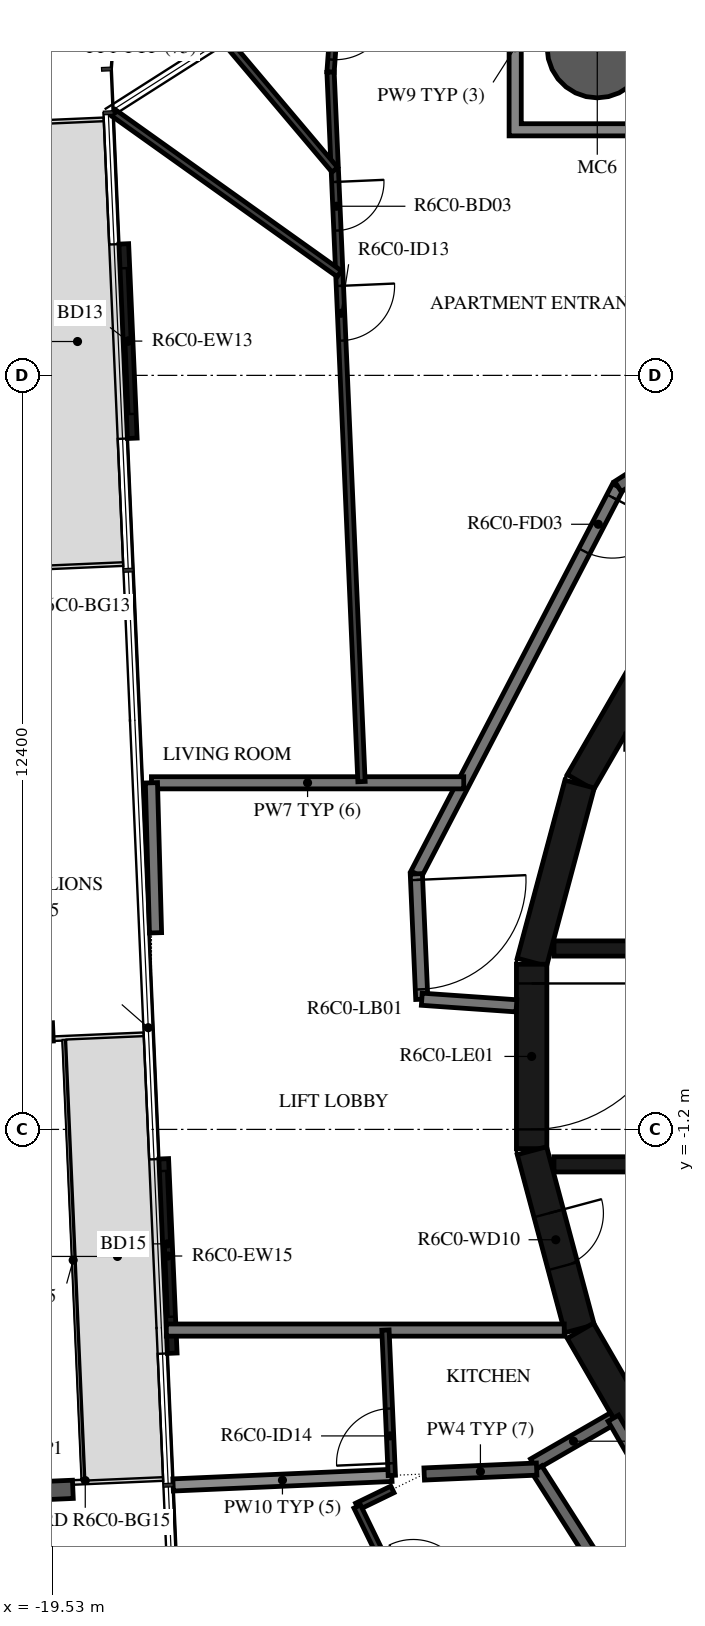
"""IFC4 building model, lengths in metres.
Left out: names, types, materials, properties, quantities, classifications, styles, units other than length and angle.
Written with IfcOpenShell. Run it as: python <this file> out.ifc"""

import sys

from ifc_helpers import new_model, si_unit, direction, frame, frame_2d, origin, origin_2d, place, context, subcontext, project, spatial, polyline, rectangle, hollow_circle, i_section, outline, extrude, element, fill, save


model = new_model("IFC4")
c1 = context("Model", 3, precision=1e-05, world=origin(), true_north=direction((0.0, 1.0)))
c2 = subcontext(c1, "Body", "Model", "MODEL_VIEW")
j1 = project(units=[si_unit("LENGTHUNIT", "METRE"), si_unit("PLANEANGLEUNIT", "RADIAN")], contexts=[c1])
p1 = place(None, origin())
s1 = spatial("IfcSite", under=j1, at=p1, CompositionType="ELEMENT")
p2 = place(p1, origin())
s2 = spatial("IfcBuilding", under=s1, at=p2, CompositionType="ELEMENT")
p3 = place(p2, frame((0.0, 0.0, 247.7)))
s3 = spatial("IfcBuildingStorey", under=s2, at=p3, CompositionType="ELEMENT", Elevation=247.7)
p4 = place(p3, frame((-10.568, 16.588, -0.38), z_axis=(0.0, 0.0, 1.0), x_axis=(1.0, 0.0, 0.0)))
e1 = element("IfcColumn", 1, at=p4, inside=s3, PredefinedType="COLUMN", context=c2, shape_type="SweptSolid", body=[
    extrude(hollow_circle(Radius=0.825, WallThickness=0.04, at=origin_2d()), origin(), (0.0, 0.0, 1.0), 3.5),
])
for number, where, z_axis, x_axis in (
    (2, (-19.97, 0.384, -0.38), (0.0, 0.0, 1.0), (-0.044, 0.999, 0.0)),
    (3, (-19.642, -7.139, -0.38), (0.0, 0.0, 1.0), (-0.044, 0.999, 0.0)),
):
    element("IfcColumn", number, at=place(p3, frame(where, z_axis=z_axis, x_axis=x_axis)), inside=s3, PredefinedType="COLUMN", context=c2, shape_type="SweptSolid", body=[
        extrude(i_section(OverallWidth=0.3, OverallDepth=0.9, WebThickness=0.019, FlangeThickness=0.035, FilletRadius=0.03, at=origin_2d()), origin(), (0.0, 0.0, 1.0), 3.5),
    ])
p5 = place(p3, frame((-18.355, 13.362, 0.0), z_axis=(0.0, 0.0, 1.0), x_axis=(0.043639181999, -0.999047357133, 0.0)))
e4 = element("IfcWall", 4, at=p5, inside=s3, PredefinedType="STANDARD", context=c2, shape_type="SweptSolid", body=[
    extrude(rectangle(XDim=3.2, YDim=0.16, at=frame_2d((1.6, 0.0))), origin(), (0.0, 0.0, 1.0), 3.12),
])
p6 = place(p5, frame((0.4, 0.0, 0.0)))
e5 = element("IfcOpeningElement", 5, at=p6, cuts=e4, PredefinedType="OPENING", context=c2, shape_type="SweptSolid", body=[
    extrude(rectangle(XDim=2.4, YDim=2.4, at=frame_2d((1.2, 1.2))), frame((0.0, 0.09, 0.0), z_axis=(0.0, -1.0, 0.0), x_axis=(1.0, 0.0, 0.0)), (0.0, 0.0, 1.0), 0.18),
])
p7 = place(p3, frame((-17.698, -1.684, 0.0), z_axis=(0.0, 0.0, 1.0), x_axis=(0.043639181999, -0.999047357133, 0.0)))
e6 = element("IfcWall", 6, at=p7, inside=s3, PredefinedType="STANDARD", context=c2, shape_type="SweptSolid", body=[
    extrude(rectangle(XDim=3.2, YDim=0.16, at=frame_2d((1.6, 0.0))), origin(), (0.0, 0.0, 1.0), 3.12),
])
p8 = place(p7, frame((0.2, 0.0, 0.0)))
e7 = element("IfcOpeningElement", 7, at=p8, cuts=e6, PredefinedType="OPENING", context=c2, shape_type="SweptSolid", body=[
    extrude(rectangle(XDim=2.4, YDim=2.4, at=frame_2d((1.2, 1.2))), frame((0.0, 0.09, 0.0), z_axis=(0.0, -1.0, 0.0), x_axis=(1.0, 0.0, 0.0)), (0.0, 0.0, 1.0), 0.18),
])
for number, where, z_axis, x_axis in (
    (8, (-9.329, 7.137, 0.0), (0.0, 0.0, 1.0), (-0.5, -0.866, 0.0)),
    (9, (-10.858, 4.479, 0.0), (0.0, 0.0, 1.0), (-0.259, -0.966, 0.0)),
):
    element("IfcWall", number, at=place(p3, frame(where, z_axis=z_axis, x_axis=x_axis)), inside=s3, PredefinedType="SHEAR", context=c2, shape_type="SweptSolid", body=[
        extrude(rectangle(XDim=3.033, YDim=0.5, at=frame_2d((1.516, 0.0))), origin(), (0.0, 0.0, 1.0), 3.12),
    ])
p9 = place(p3, frame((-11.647, 1.516, 0.0), z_axis=(0.0, 0.0, 1.0), x_axis=(0.0, -1.0, 0.0)))
e10 = element("IfcWall", 10, at=p9, inside=s3, PredefinedType="SHEAR", context=c2, shape_type="SweptSolid", body=[
    extrude(rectangle(XDim=3.033, YDim=0.5, at=frame_2d((1.516, 0.0))), origin(), (0.0, 0.0, 1.0), 3.12),
])
p10 = place(p9, frame((0.316, 0.0, 0.0)))
e11 = element("IfcOpeningElement", 11, at=p10, cuts=e10, PredefinedType="OPENING", context=c2, shape_type="SweptSolid", body=[
    extrude(rectangle(XDim=2.4, YDim=2.1, at=frame_2d((1.2, 1.05))), frame((0.0, 0.26, 0.0), z_axis=(0.0, -1.0, 0.0), x_axis=(1.0, 0.0, 0.0)), (0.0, 0.0, 1.0), 0.52),
])
p11 = place(p3, frame((-11.643, -1.55, 0.0), z_axis=(0.0, 0.0, 1.0), x_axis=(0.258734743916, -0.965948410781, 0.0)))
e12 = element("IfcWall", 12, at=p11, inside=s3, PredefinedType="SHEAR", context=c2, shape_type="SweptSolid", body=[
    extrude(rectangle(XDim=3.033, YDim=0.5, at=frame_2d((1.516, 0.0))), origin(), (0.0, 0.0, 1.0), 3.12),
])
p12 = place(p11, frame((1.066, 0.0, 0.0)))
e13 = element("IfcOpeningElement", 13, at=p12, cuts=e12, PredefinedType="OPENING", context=c2, shape_type="SweptSolid", body=[
    extrude(rectangle(XDim=0.9, YDim=2.1, at=frame_2d((0.45, 1.05))), frame((0.0, 0.26, 0.0), z_axis=(0.0, -1.0, 0.0), x_axis=(1.0, 0.0, 0.0)), (0.0, 0.0, 1.0), 0.52),
])
p13 = place(p3, frame((-10.845, -4.51, 0.0), z_axis=(0.0, 0.0, 1.0), x_axis=(0.500087131594, -0.865975092491, 0.0)))
e14 = element("IfcWall", 14, at=p13, inside=s3, PredefinedType="SHEAR", context=c2, shape_type="SweptSolid", body=[
    extrude(rectangle(XDim=3.033, YDim=0.5, at=frame_2d((1.516, 0.0))), origin(), (0.0, 0.0, 1.0), 3.12),
])
p14 = place(p3, frame((-11.28, 1.775, 0.0), z_axis=(0.0, 0.0, 1.0), x_axis=(1.0, 0.0, 0.0)))
e15 = element("IfcWall", 15, at=p14, inside=s3, PredefinedType="SHEAR", context=c2, shape_type="SweptSolid", body=[
    extrude(rectangle(XDim=14.38, YDim=0.25, at=frame_2d((7.19, 0.0))), origin(), (0.0, 0.0, 1.0), 3.12),
])
p15 = place(p14, frame((10.73, 0.0, 0.0)))
e16 = element("IfcOpeningElement", 16, at=p15, cuts=e15, PredefinedType="OPENING", context=c2, shape_type="SweptSolid", body=[
    extrude(rectangle(XDim=1.1, YDim=2.1, at=frame_2d((0.55, 1.05))), frame((0.0, 0.135, 0.0), z_axis=(0.0, -1.0, 0.0), x_axis=(1.0, 0.0, 0.0)), (0.0, 0.0, 1.0), 0.27),
])
p16 = place(p14, frame((12.88, 0.0, 0.0)))
e17 = element("IfcOpeningElement", 17, at=p16, cuts=e15, PredefinedType="OPENING", context=c2, shape_type="SweptSolid", body=[
    extrude(rectangle(XDim=1.1, YDim=2.1, at=frame_2d((0.55, 1.05))), frame((0.0, 0.135, 0.0), z_axis=(0.0, -1.0, 0.0), x_axis=(1.0, 0.0, 0.0)), (0.0, 0.0, 1.0), 0.27),
])
p17 = place(p14, frame((5.455, 0.0, 0.0)))
e18 = element("IfcOpeningElement", 18, at=p17, cuts=e15, PredefinedType="OPENING", context=c2, shape_type="SweptSolid", body=[
    extrude(rectangle(XDim=0.9, YDim=2.1, at=frame_2d((0.45, 1.05))), frame((0.0, 0.135, 0.0), z_axis=(0.0, -1.0, 0.0), x_axis=(1.0, 0.0, 0.0)), (0.0, 0.0, 1.0), 0.27),
])
p18 = place(p3, frame((-11.28, -1.775, 0.0), z_axis=(0.0, 0.0, 1.0), x_axis=(1.0, 0.0, 0.0)))
e19 = element("IfcWall", 19, at=p18, inside=s3, PredefinedType="SHEAR", context=c2, shape_type="SweptSolid", body=[
    extrude(rectangle(XDim=14.38, YDim=0.25, at=frame_2d((7.19, 0.0))), origin(), (0.0, 0.0, 1.0), 3.12),
])
p19 = place(p18, frame((12.88, 0.0, 0.0)))
e20 = element("IfcOpeningElement", 20, at=p19, cuts=e19, PredefinedType="OPENING", context=c2, shape_type="SweptSolid", body=[
    extrude(rectangle(XDim=1.1, YDim=2.1, at=frame_2d((0.55, 1.05))), frame((0.0, 0.135, 0.0), z_axis=(0.0, -1.0, 0.0), x_axis=(1.0, 0.0, 0.0)), (0.0, 0.0, 1.0), 0.27),
])
p20 = place(p18, frame((6.53, 0.0, 0.0)))
e21 = element("IfcOpeningElement", 21, at=p20, cuts=e19, PredefinedType="OPENING", context=c2, shape_type="SweptSolid", body=[
    extrude(rectangle(XDim=0.9, YDim=2.1, at=frame_2d((0.45, 1.05))), frame((0.0, 0.135, 0.0), z_axis=(0.0, -1.0, 0.0), x_axis=(1.0, 0.0, 0.0)), (0.0, 0.0, 1.0), 0.27),
])
p21 = place(p18, frame((8.68, 0.0, 0.0)))
e22 = element("IfcOpeningElement", 22, at=p21, cuts=e19, PredefinedType="OPENING", context=c2, shape_type="SweptSolid", body=[
    extrude(rectangle(XDim=0.9, YDim=2.1, at=frame_2d((0.45, 1.05))), frame((0.0, 0.135, 0.0), z_axis=(0.0, -1.0, 0.0), x_axis=(1.0, 0.0, 0.0)), (0.0, 0.0, 1.0), 0.27),
])
p22 = place(p18, frame((10.83, 0.0, 0.0)))
e23 = element("IfcOpeningElement", 23, at=p22, cuts=e19, PredefinedType="OPENING", context=c2, shape_type="SweptSolid", body=[
    extrude(rectangle(XDim=0.9, YDim=2.1, at=frame_2d((0.45, 1.05))), frame((0.0, 0.135, 0.0), z_axis=(0.0, -1.0, 0.0), x_axis=(1.0, 0.0, 0.0)), (0.0, 0.0, 1.0), 0.27),
])
p23 = place(p3, frame((-10.228, 9.372, 0.0), z_axis=(0.0, 0.0, 1.0), x_axis=(-0.461759464021, -0.887005184532, 0.0)))
e24 = element("IfcWall", 24, at=p23, inside=s3, PredefinedType="STANDARD", context=c2, shape_type="SweptSolid", body=[
    extrude(rectangle(XDim=7.181, YDim=0.2, at=frame_2d((3.591, 0.0))), origin(), (0.0, 0.0, 1.0), 3.12),
])
p24 = place(p23, frame((0.2, 0.0, 0.0)))
e25 = element("IfcOpeningElement", 25, at=p24, cuts=e24, PredefinedType="OPENING", context=c2, shape_type="SweptSolid", body=[
    extrude(rectangle(XDim=1.0, YDim=2.1, at=frame_2d((0.5, 1.05))), frame((0.0, 0.11, 0.0), z_axis=(0.0, -1.0, 0.0), x_axis=(1.0, 0.0, 0.0)), (0.0, 0.0, 1.0), 0.22),
])
p25 = place(p3, frame((-13.544, 3.003, 0.0), z_axis=(0.0, 0.0, 1.0), x_axis=(0.043652842459, -0.99904676034, 0.0)))
e26 = element("IfcWall", 26, at=p25, inside=s3, PredefinedType="STANDARD", context=c2, shape_type="SweptSolid", body=[
    extrude(rectangle(XDim=2.064, YDim=0.2, at=frame_2d((1.032, 0.0))), origin(), (0.0, 0.0, 1.0), 3.12),
])
p26 = place(p25, frame((0.1, 0.0, 0.0)))
e27 = element("IfcOpeningElement", 27, at=p26, cuts=e26, PredefinedType="OPENING", context=c2, shape_type="SweptSolid", body=[
    extrude(rectangle(XDim=1.8, YDim=2.1, at=frame_2d((0.9, 1.05))), frame((0.0, 0.11, 0.0), z_axis=(0.0, -1.0, 0.0), x_axis=(1.0, 0.0, 0.0)), (0.0, 0.0, 1.0), 0.22),
])
p27 = place(p3, frame((-13.454, 0.941, 0.0), z_axis=(0.0, 0.0, 1.0), x_axis=(0.99755155062, -0.069934997354, 0.0)))
e28 = element("IfcWall", 28, at=p27, inside=s3, PredefinedType="STANDARD", context=c2, shape_type="SweptSolid", body=[
    extrude(rectangle(XDim=1.561, YDim=0.2, at=frame_2d((0.78, 0.0))), origin(), (0.0, 0.0, 1.0), 3.12),
])
p28 = place(p3, frame((-4.172, 13.231, 0.0), z_axis=(0.0, 0.0, 1.0), x_axis=(-0.843388394728, -0.537304397561, 0.0)))
e29 = element("IfcWall", 29, at=p28, inside=s3, PredefinedType="STANDARD", context=c2, shape_type="SweptSolid", body=[
    extrude(rectangle(XDim=7.181, YDim=0.2, at=frame_2d((3.59, 0.0))), origin(), (0.0, 0.0, 1.0), 3.12),
])
p29 = place(p3, frame((-10.303, -5.949, 0.0), z_axis=(0.0, 0.0, 1.0), x_axis=(-0.866043382451, -0.499968858743, 0.0)))
e30 = element("IfcWall", 30, at=p29, inside=s3, PredefinedType="STANDARD", context=c2, shape_type="SweptSolid", body=[
    extrude(rectangle(XDim=1.515, YDim=0.2, at=frame_2d((0.758, 0.0))), origin(), (0.0, 0.0, 1.0), 3.12),
])
p30 = place(p3, frame((-9.52, -7.305, 0.0), z_axis=(0.0, 0.0, 1.0), x_axis=(-0.500028278809, 0.866009076391, 0.0)))
e31 = element("IfcWall", 31, at=p30, inside=s3, PredefinedType="STANDARD", context=c2, shape_type="SweptSolid", body=[
    extrude(rectangle(XDim=1.566, YDim=0.2, at=frame_2d((0.783, 0.0))), origin(), (0.0, 0.0, 1.0), 3.12),
])
p31 = place(p3, frame((-11.565, -6.786, 0.0), z_axis=(0.0, 0.0, 1.0), x_axis=(0.537297327359, -0.843392898958, 0.0)))
e32 = element("IfcWall", 32, at=p31, inside=s3, PredefinedType="STANDARD", context=c2, shape_type="SweptSolid", body=[
    extrude(rectangle(XDim=4.081, YDim=0.2, at=frame_2d((2.041, 0.0))), origin(), (0.0, 0.0, 1.0), 3.12),
])
p32 = place(p3, frame((-12.764, 4.5, 0.0), z_axis=(0.0, 0.0, 1.0), x_axis=(-1.0, 0.0, 0.0)))
e33 = element("IfcWall", 33, at=p32, inside=s3, PredefinedType="STANDARD", context=c2, shape_type="SweptSolid", body=[
    extrude(rectangle(XDim=5.135, YDim=0.2, at=frame_2d((2.568, 0.0))), origin(), (0.0, 0.0, 1.0), 3.12),
])
p33 = place(p3, frame((-17.9, 4.5, 0.0), z_axis=(0.0, 0.0, 1.0), x_axis=(0.027204178319, -0.999629897853, 0.0)))
e34 = element("IfcWall", 34, at=p33, inside=s3, PredefinedType="STANDARD", context=c2, shape_type="SweptSolid", body=[
    extrude(rectangle(XDim=2.468, YDim=0.2, at=frame_2d((1.234, 0.0))), origin(), (0.0, 0.0, 1.0), 3.12),
])
p34 = place(p3, frame((-17.655, -4.5, 0.0), z_axis=(0.0, 0.0, 1.0), x_axis=(1.0, 0.0, 0.0)))
e35 = element("IfcWall", 35, at=p34, inside=s3, PredefinedType="STANDARD", context=c2, shape_type="SweptSolid", body=[
    extrude(rectangle(XDim=6.543, YDim=0.2, at=frame_2d((3.272, 0.0))), origin(), (0.0, 0.0, 1.0), 3.12),
])
p35 = place(p3, frame((-17.544, -7.047, 0.0), z_axis=(0.0, 0.0, 1.0), x_axis=(0.999045894436, 0.043672655174, 0.0)))
e36 = element("IfcWall", 36, at=p35, inside=s3, PredefinedType="STANDARD", context=c2, shape_type="SweptSolid", body=[
    extrude(rectangle(XDim=3.6, YDim=0.2, at=frame_2d((1.8, 0.0))), origin(), (0.0, 0.0, 1.0), 2.73),
])
p36 = place(p3, frame((-13.414, -6.867, 0.0), z_axis=(0.0, 0.0, 1.0), x_axis=(0.999046427216, 0.043660465726, 0.0)))
e37 = element("IfcWall", 37, at=p36, inside=s3, PredefinedType="STANDARD", context=c2, shape_type="SweptSolid", body=[
    extrude(rectangle(XDim=1.851, YDim=0.2, at=frame_2d((0.925, 0.0))), origin(), (0.0, 0.0, 1.0), 3.12),
])
p37 = place(p3, frame((-14.865, 17.411, 0.0), z_axis=(0.0, 0.0, 1.0), x_axis=(-0.072618457011, -0.997359794508, 0.0)))
e38 = element("IfcWall", 38, at=p37, inside=s3, PredefinedType="PARTITIONING", context=c2, shape_type="SweptSolid", body=[
    extrude(rectangle(XDim=1.227, YDim=0.12, at=frame_2d((0.614, 0.0))), origin(), (0.0, 0.0, 1.0), 3.12),
])
p38 = place(p37, frame((0.12, 0.0, 0.0)))
e39 = element("IfcOpeningElement", 39, at=p38, cuts=e38, PredefinedType="OPENING", context=c2, shape_type="SweptSolid", body=[
    extrude(rectangle(XDim=0.9, YDim=2.1, at=frame_2d((0.45, 1.05))), frame((0.0, 0.07, 0.0), z_axis=(0.0, -1.0, 0.0), x_axis=(1.0, 0.0, 0.0)), (0.0, 0.0, 1.0), 0.14),
])
p39 = place(p3, frame((-14.955, 16.187, 0.0), z_axis=(0.0, 0.0, 1.0), x_axis=(0.04360777668, -0.999048728448, 0.0)))
e40 = element("IfcWall", 40, at=p39, inside=s3, PredefinedType="PARTITIONING", context=c2, shape_type="SweptSolid", body=[
    extrude(rectangle(XDim=11.679, YDim=0.12, at=frame_2d((5.839, 0.0))), origin(), (0.0, 0.0, 1.0), 3.12),
])
p40 = place(p39, frame((1.808, 0.0, 0.0)))
e41 = element("IfcOpeningElement", 41, at=p40, cuts=e40, PredefinedType="OPENING", context=c2, shape_type="SweptSolid", body=[
    extrude(rectangle(XDim=0.8, YDim=2.1, at=frame_2d((0.4, 1.05))), frame((0.0, 0.07, 0.0), z_axis=(0.0, -1.0, 0.0), x_axis=(1.0, 0.0, 0.0)), (0.0, 0.0, 1.0), 0.14),
])
p41 = place(p39, frame((3.519, 0.0, 0.0)))
e42 = element("IfcOpeningElement", 42, at=p41, cuts=e40, PredefinedType="OPENING", context=c2, shape_type="SweptSolid", body=[
    extrude(rectangle(XDim=0.9, YDim=2.1, at=frame_2d((0.45, 1.05))), frame((0.0, 0.07, 0.0), z_axis=(0.0, -1.0, 0.0), x_axis=(1.0, 0.0, 0.0)), (0.0, 0.0, 1.0), 0.14),
])
p42 = place(p3, frame((-18.269, 18.589, 0.0), z_axis=(0.0, 0.0, 1.0), x_axis=(0.645124067673, -0.764077834588, 0.0)))
e43 = element("IfcWall", 43, at=p42, inside=s3, PredefinedType="PARTITIONING", context=c2, shape_type="SweptSolid", body=[
    extrude(rectangle(XDim=5.246, YDim=0.12, at=frame_2d((2.623, 0.0))), origin(), (0.0, 0.0, 1.0), 3.12),
])
p43 = place(p3, frame((-18.529, 15.522, 0.0), z_axis=(0.0, 0.0, 1.0), x_axis=(0.814350646776, -0.580373176582, 0.0)))
e44 = element("IfcWall", 44, at=p43, inside=s3, PredefinedType="PARTITIONING", context=c2, shape_type="SweptSolid", body=[
    extrude(rectangle(XDim=4.567, YDim=0.12, at=frame_2d((2.284, 0.0))), origin(), (0.0, 0.0, 1.0), 3.12),
])
p44 = place(p3, frame((-13.947, -6.89, 0.0), z_axis=(0.0, 0.0, 1.0), x_axis=(-0.043680814195, 0.999045537737, 0.0)))
e45 = element("IfcWall", 45, at=p44, inside=s3, PredefinedType="PARTITIONING", context=c2, shape_type="SweptSolid", body=[
    extrude(rectangle(XDim=2.392, YDim=0.12, at=frame_2d((1.196, 0.0))), origin(), (0.0, 0.0, 1.0), 3.12),
])
p45 = place(p44, frame((0.2, 0.0, 0.0)))
e46 = element("IfcOpeningElement", 46, at=p45, cuts=e45, PredefinedType="OPENING", context=c2, shape_type="SweptSolid", body=[
    extrude(rectangle(XDim=0.9, YDim=2.1, at=frame_2d((0.45, 1.05))), frame((0.0, 0.07, 0.0), z_axis=(0.0, -1.0, 0.0), x_axis=(1.0, 0.0, 0.0)), (0.0, 0.0, 1.0), 0.14),
])
p46 = place(p3, frame((-13.937, -7.121, 0.0), z_axis=(0.0, 0.0, 1.0), x_axis=(-0.899601864835, -0.436710985418, 0.0)))
e47 = element("IfcWall", 47, at=p46, inside=s3, PredefinedType="PARTITIONING", context=c2, shape_type="SweptSolid", body=[
    extrude(rectangle(XDim=0.644, YDim=0.12, at=frame_2d((0.322, 0.0))), origin(), (0.0, 0.0, 1.0), 3.12),
])
p47 = place(p3, frame((-14.516, -7.402, 0.0), z_axis=(0.0, 0.0, 1.0), x_axis=(0.436676244377, -0.899618729016, 0.0)))
e48 = element("IfcWall", 48, at=p47, inside=s3, PredefinedType="PARTITIONING", context=c2, shape_type="SweptSolid", body=[
    extrude(rectangle(XDim=1.487, YDim=0.12, at=frame_2d((0.744, 0.0))), origin(), (0.0, 0.0, 1.0), 3.12),
])
p48 = place(p3, origin())
e49 = element("IfcWall", 49, at=p48, inside=s3, PredefinedType="STANDARD", context=c2, shape_type="SweptSolid", body=[
    extrude(outline(polyline([(-9.118, 18.038), (-9.118, 15.138), (-12.018, 15.138), (-12.018, 18.038), (-9.118, 18.038)]), holes=[polyline([(-11.818, 15.338), (-9.318, 15.338), (-9.318, 17.838), (-11.818, 17.838), (-11.818, 15.338)])]), origin(), (0.0, 0.0, 1.0), 3.12),
])
p49 = place(p6, origin())
e50 = element("IfcDoor", 50, at=p49, inside=s3, OperationType="DOUBLE_DOOR_SLIDING", PredefinedType="DOOR", context=c2, shape_type="SweptSolid", body=[
    extrude(rectangle(XDim=2.4, YDim=2.4, at=frame_2d((1.2, 1.2))), frame((0.0, 0.025, 0.0), z_axis=(0.0, -1.0, 0.0), x_axis=(1.0, 0.0, 0.0)), (0.0, 0.0, 1.0), 0.05),
])
fill(e5, e50)
p50 = place(p8, origin())
e51 = element("IfcDoor", 51, at=p50, inside=s3, OperationType="DOUBLE_DOOR_SLIDING", PredefinedType="DOOR", context=c2, shape_type="SweptSolid", body=[
    extrude(rectangle(XDim=2.4, YDim=2.4, at=frame_2d((1.2, 1.2))), frame((0.0, 0.025, 0.0), z_axis=(0.0, -1.0, 0.0), x_axis=(1.0, 0.0, 0.0)), (0.0, 0.0, 1.0), 0.05),
])
fill(e7, e51)
p51 = place(p10, origin())
e52 = element("IfcDoor", 52, at=p51, inside=s3, OperationType="DOUBLE_DOOR_SINGLE_SWING", PredefinedType="DOOR", context=c2, shape_type="SweptSolid", body=[
    extrude(rectangle(XDim=2.4, YDim=2.1, at=frame_2d((1.2, 1.05))), frame((0.0, 0.025, 0.0), z_axis=(0.0, -1.0, 0.0), x_axis=(1.0, 0.0, 0.0)), (0.0, 0.0, 1.0), 0.05),
])
fill(e11, e52)
p52 = place(p12, origin())
e53 = element("IfcDoor", 53, at=p52, inside=s3, OperationType="SINGLE_SWING_RIGHT", PredefinedType="DOOR", context=c2, shape_type="SweptSolid", body=[
    extrude(rectangle(XDim=0.9, YDim=2.1, at=frame_2d((0.45, 1.05))), frame((0.0, 0.025, 0.0), z_axis=(0.0, -1.0, 0.0), x_axis=(1.0, 0.0, 0.0)), (0.0, 0.0, 1.0), 0.05),
])
fill(e13, e53)
p53 = place(p24, origin())
e54 = element("IfcDoor", 54, at=p53, inside=s3, OperationType="SINGLE_SWING_LEFT", PredefinedType="DOOR", context=c2, shape_type="SweptSolid", body=[
    extrude(rectangle(XDim=1.0, YDim=2.1, at=frame_2d((0.5, 1.05))), frame((0.0, 0.025, 0.0), z_axis=(0.0, -1.0, 0.0), x_axis=(1.0, 0.0, 0.0)), (0.0, 0.0, 1.0), 0.05),
])
fill(e25, e54)
p54 = place(p38, origin())
e55 = element("IfcDoor", 55, at=p54, inside=s3, OperationType="SINGLE_SWING_LEFT", PredefinedType="DOOR", context=c2, shape_type="SweptSolid", body=[
    extrude(rectangle(XDim=0.9, YDim=2.1, at=frame_2d((0.45, 1.05))), frame((0.0, 0.025, 0.0), z_axis=(0.0, -1.0, 0.0), x_axis=(1.0, 0.0, 0.0)), (0.0, 0.0, 1.0), 0.05),
])
fill(e39, e55)
p55 = place(p40, origin())
e56 = element("IfcDoor", 56, at=p55, inside=s3, OperationType="SINGLE_SWING_LEFT", PredefinedType="DOOR", context=c2, shape_type="SweptSolid", body=[
    extrude(rectangle(XDim=0.8, YDim=2.1, at=frame_2d((0.4, 1.05))), frame((0.0, 0.025, 0.0), z_axis=(0.0, -1.0, 0.0), x_axis=(1.0, 0.0, 0.0)), (0.0, 0.0, 1.0), 0.05),
])
fill(e41, e56)
p56 = place(p41, origin())
e57 = element("IfcDoor", 57, at=p56, inside=s3, OperationType="SINGLE_SWING_LEFT", PredefinedType="DOOR", context=c2, shape_type="SweptSolid", body=[
    extrude(rectangle(XDim=0.9, YDim=2.1, at=frame_2d((0.45, 1.05))), frame((0.0, 0.025, 0.0), z_axis=(0.0, -1.0, 0.0), x_axis=(1.0, 0.0, 0.0)), (0.0, 0.0, 1.0), 0.05),
])
fill(e42, e57)
p57 = place(p45, origin())
e58 = element("IfcDoor", 58, at=p57, inside=s3, OperationType="SINGLE_SWING_LEFT", PredefinedType="DOOR", context=c2, shape_type="SweptSolid", body=[
    extrude(rectangle(XDim=0.9, YDim=2.1, at=frame_2d((0.45, 1.05))), frame((0.0, 0.025, 0.0), z_axis=(0.0, -1.0, 0.0), x_axis=(1.0, 0.0, 0.0)), (0.0, 0.0, 1.0), 0.05),
])
fill(e46, e58)
p58 = place(p26, origin())
e59 = element("IfcDoor", 59, at=p58, inside=s3, OperationType="DOUBLE_DOOR_SINGLE_SWING", PredefinedType="DOOR", context=c2, shape_type="SweptSolid", body=[
    extrude(rectangle(XDim=1.8, YDim=2.1, at=frame_2d((0.9, 1.05))), frame((0.0, 0.025, 0.0), z_axis=(0.0, -1.0, 0.0), x_axis=(1.0, 0.0, 0.0)), (0.0, 0.0, 1.0), 0.05),
])
fill(e27, e59)
save(model, sys.argv[1])
